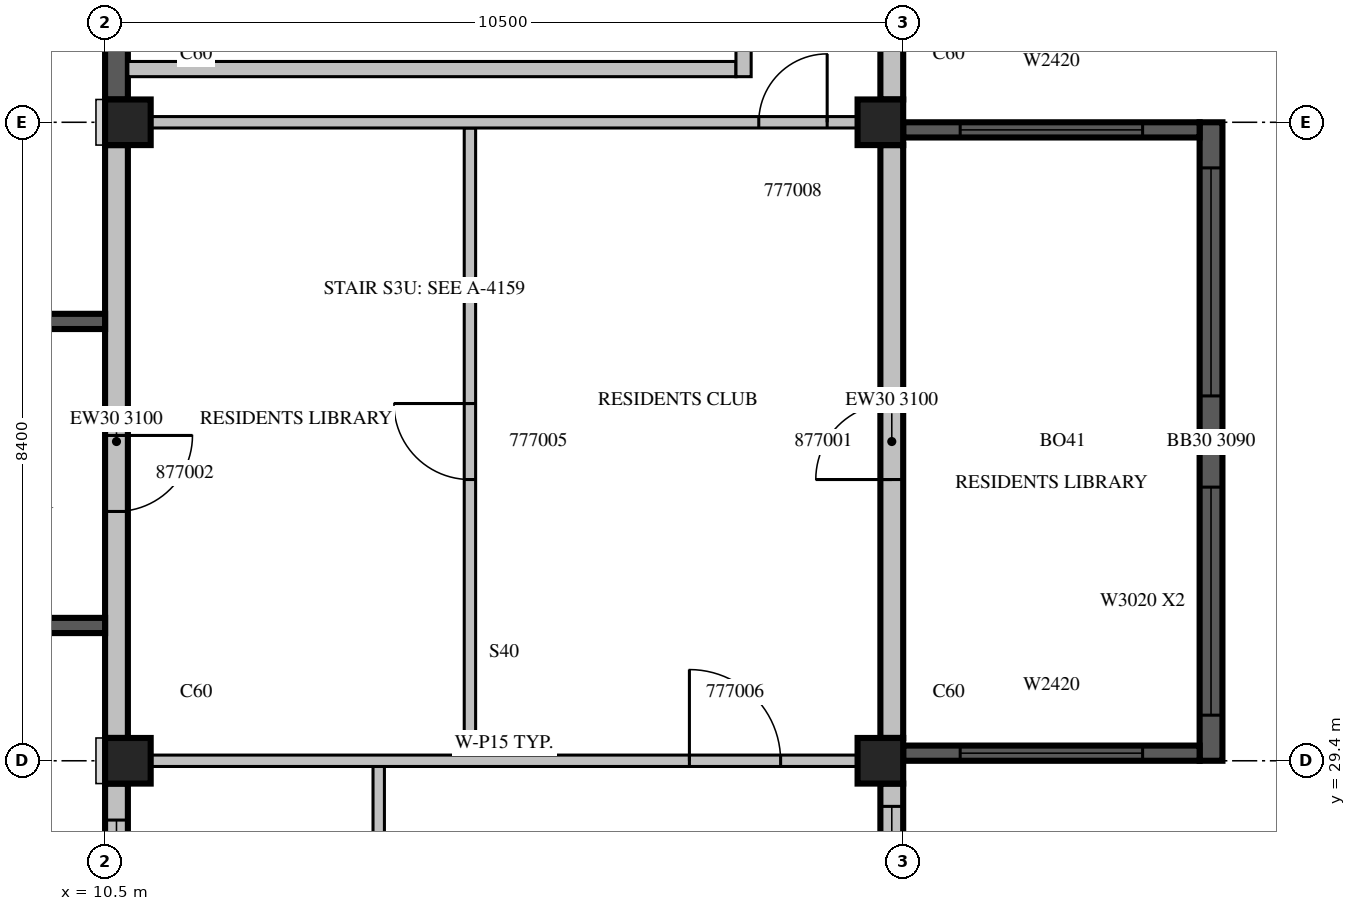
"""IFC4 building model, lengths in metres.
Left out: names, types, materials, properties, quantities, classifications, styles, units other than length and angle.
Written with IfcOpenShell. Run it as: python <this file> out.ifc"""

import sys

from ifc_helpers import new_model, si_unit, direction, frame, frame_2d, origin, origin_2d, place, context, subcontext, project, spatial, rectangle, extrude, source, transform, mapped, element, fill, save


model = new_model("IFC4")
c1 = context("Model", 3, precision=1e-05, world=origin(), true_north=direction((0.0, 1.0)))
c2 = subcontext(c1, "Body", "Model", "MODEL_VIEW")
j1 = project(units=[si_unit("LENGTHUNIT", "METRE"), si_unit("PLANEANGLEUNIT", "RADIAN")], contexts=[c1])
p1 = place(None, origin())
s1 = spatial("IfcSite", under=j1, at=p1, CompositionType="ELEMENT")
p2 = place(p1, origin())
s2 = spatial("IfcBuilding", under=s1, at=p2, CompositionType="ELEMENT")
p3 = place(p2, frame((0.0, 0.0, 330.0)))
s3 = spatial("IfcBuildingStorey", under=s2, at=p3, CompositionType="ELEMENT", Elevation=330.0)
m1 = source(origin(), c2, "Body", "SweptSolid", [
    extrude(rectangle(XDim=0.6, YDim=0.6, at=origin_2d()), origin(), (0.0, 0.0, 1.0), 3.5),
])
for number, where, z_axis, x_axis in (
    (1, (10.8, 29.4, 0.0), (0.0, 0.0, 1.0), (1.0, 0.0, 0.0)),
    (2, (20.7, 29.4, 0.0), (0.0, 0.0, 1.0), (1.0, 0.0, 0.0)),
    (3, (10.8, 37.8, 0.0), (0.0, 0.0, 1.0), (1.0, 0.0, 0.0)),
    (4, (20.7, 37.8, 0.0), (0.0, 0.0, 1.0), (1.0, 0.0, 0.0)),
):
    element("IfcColumn", number, at=place(p3, frame(where, z_axis=z_axis, x_axis=x_axis)), inside=s3, PredefinedType="COLUMN", context=c2, shape_type="MappedRepresentation", body=[
        mapped(m1, transform((0.0, 0.0, 0.0), scale=1.0)),
    ])
m2 = source(origin(), c2, "Body", "SweptSolid", [
    extrude(rectangle(XDim=7.5, YDim=0.3, at=frame_2d((3.75, 0.0))), origin(), (0.0, 0.0, 1.0), 3.1),
])
p4 = place(p3, frame((20.85, 21.6, 0.0), z_axis=(0.0, 0.0, 1.0), x_axis=(0.0, 1.0, 0.0)))
e5 = element("IfcWall", 5, at=p4, inside=s3, PredefinedType="STANDARD", context=c2, shape_type="MappedRepresentation", body=[
    mapped(m2, transform((0.0, 0.0, 0.0), scale=1.0)),
])
m3 = source(origin(), c2, "Body", "SweptSolid", [
    extrude(rectangle(XDim=1.8, YDim=2.0, at=frame_2d((0.9, 1.0))), frame((0.0, 0.16, 0.0), z_axis=(0.0, -1.0, 0.0), x_axis=(1.0, 0.0, 0.0)), (0.0, 0.0, 1.0), 0.32),
])
p5 = place(p4, frame((0.463, 0.0, 0.6)))
e6 = element("IfcOpeningElement", 6, at=p5, cuts=e5, PredefinedType="OPENING", context=c2, shape_type="MappedRepresentation", body=[
    mapped(m3, transform((0.0, 0.0, 0.0), scale=1.0)),
])
m4 = source(origin(), c2, "Body", "SweptSolid", [
    extrude(rectangle(XDim=3.0, YDim=2.0, at=frame_2d((1.5, 1.0))), frame((0.0, 0.16, 0.0), z_axis=(0.0, -1.0, 0.0), x_axis=(1.0, 0.0, 0.0)), (0.0, 0.0, 1.0), 0.32),
])
p6 = place(p4, frame((4.2, 0.0, 0.6)))
e7 = element("IfcOpeningElement", 7, at=p6, cuts=e5, PredefinedType="OPENING", context=c2, shape_type="MappedRepresentation", body=[
    mapped(m4, transform((0.0, 0.0, 0.0), scale=1.0)),
])
m5 = source(origin(), c2, "Body", "SweptSolid", [
    extrude(rectangle(XDim=7.8, YDim=0.3, at=frame_2d((3.9, 0.0))), origin(), (0.0, 0.0, 1.0), 3.1),
])
p7 = place(p3, frame((20.85, 29.7, 0.0), z_axis=(0.0, 0.0, 1.0), x_axis=(0.0, 1.0, 0.0)))
e8 = element("IfcWall", 8, at=p7, inside=s3, PredefinedType="STANDARD", context=c2, shape_type="MappedRepresentation", body=[
    mapped(m5, transform((0.0, 0.0, 0.0), scale=1.0)),
])
m6 = source(origin(), c2, "Body", "SweptSolid", [
    extrude(rectangle(XDim=1.0, YDim=2.1, at=frame_2d((0.5, 1.05))), frame((0.0, 0.16, 0.0), z_axis=(0.0, -1.0, 0.0), x_axis=(1.0, 0.0, 0.0)), (0.0, 0.0, 1.0), 0.32),
])
p8 = place(p7, frame((3.4, 0.0, 0.0)))
e9 = element("IfcOpeningElement", 9, at=p8, cuts=e8, PredefinedType="OPENING", context=c2, shape_type="MappedRepresentation", body=[
    mapped(m6, transform((0.0, 0.0, 0.0), scale=1.0)),
])
m7 = source(origin(), c2, "Body", "SweptSolid", [
    extrude(rectangle(XDim=5.58, YDim=0.3, at=frame_2d((2.79, 0.0))), origin(), (0.0, 0.0, 1.0), 3.1),
])
p9 = place(p3, frame((20.85, 38.1, 0.0), z_axis=(0.0, 0.0, 1.0), x_axis=(0.0, 1.0, 0.0)))
e10 = element("IfcWall", 10, at=p9, inside=s3, PredefinedType="STANDARD", context=c2, shape_type="MappedRepresentation", body=[
    mapped(m7, transform((0.0, 0.0, 0.0), scale=1.0)),
])
m8 = source(origin(), c2, "Body", "SweptSolid", [
    extrude(rectangle(XDim=3.6, YDim=2.0, at=frame_2d((1.8, 1.0))), frame((0.0, 0.16, 0.0), z_axis=(0.0, -1.0, 0.0), x_axis=(1.0, 0.0, 0.0)), (0.0, 0.0, 1.0), 0.32),
])
p10 = place(p9, frame((0.84, 0.0, 0.6)))
e11 = element("IfcOpeningElement", 11, at=p10, cuts=e10, PredefinedType="OPENING", context=c2, shape_type="MappedRepresentation", body=[
    mapped(m8, transform((0.0, 0.0, 0.0), scale=1.0)),
])
m9 = source(origin(), c2, "Body", "SweptSolid", [
    extrude(rectangle(XDim=5.58, YDim=0.3, at=frame_2d((2.79, 0.0))), origin(), (0.0, 0.0, 1.0), 3.1),
])
p11 = place(p3, frame((10.65, 43.68, 0.0), z_axis=(0.0, 0.0, 1.0), x_axis=(0.0, -1.0, 0.0)))
e12 = element("IfcWall", 12, at=p11, inside=s3, PredefinedType="SOLIDWALL", context=c2, shape_type="MappedRepresentation", body=[
    mapped(m9, transform((0.0, 0.0, 0.0), scale=1.0)),
])
p12 = place(p3, frame((10.65, 37.5, 0.0), z_axis=(0.0, 0.0, 1.0), x_axis=(0.0, -1.0, 0.0)))
e13 = element("IfcWall", 13, at=p12, inside=s3, PredefinedType="STANDARD", context=c2, shape_type="MappedRepresentation", body=[
    mapped(m5, transform((0.0, 0.0, 0.0), scale=1.0)),
])
p13 = place(p12, frame((3.82, 0.0, 0.0)))
e14 = element("IfcOpeningElement", 14, at=p13, cuts=e13, PredefinedType="OPENING", context=c2, shape_type="MappedRepresentation", body=[
    mapped(m6, transform((0.0, 0.0, 0.0), scale=1.0)),
])
p14 = place(p3, frame((10.65, 29.1, 0.0), z_axis=(0.0, 0.0, 1.0), x_axis=(0.0, -1.0, 0.0)))
e15 = element("IfcWall", 15, at=p14, inside=s3, PredefinedType="STANDARD", context=c2, shape_type="MappedRepresentation", body=[
    mapped(m2, transform((0.0, 0.0, 0.0), scale=1.0)),
])
p15 = place(p14, frame((3.36, 0.0, 0.6)))
e16 = element("IfcOpeningElement", 16, at=p15, cuts=e15, PredefinedType="OPENING", context=c2, shape_type="MappedRepresentation", body=[
    mapped(m8, transform((0.0, 0.0, 0.0), scale=1.0)),
])
m10 = source(origin(), c2, "Body", "SweptSolid", [
    extrude(rectangle(XDim=2.4, YDim=2.0, at=frame_2d((1.2, 1.0))), frame((0.0, 0.16, 0.0), z_axis=(0.0, -1.0, 0.0), x_axis=(1.0, 0.0, 0.0)), (0.0, 0.0, 1.0), 0.32),
])
p16 = place(p14, frame((0.48, 0.0, 0.6)))
e17 = element("IfcOpeningElement", 17, at=p16, cuts=e15, PredefinedType="OPENING", context=c2, shape_type="MappedRepresentation", body=[
    mapped(m10, transform((0.0, 0.0, 0.0), scale=1.0)),
])
m11 = source(origin(), c2, "Body", "SweptSolid", [
    extrude(rectangle(XDim=8.4, YDim=0.3, at=frame_2d((4.2, 0.0))), origin(), (0.0, 0.0, 1.0), 3.09),
])
p17 = place(p3, frame((25.05, 29.4, 0.0), z_axis=(0.0, 0.0, 1.0), x_axis=(0.0, 1.0, 0.0)))
e18 = element("IfcWall", 18, at=p17, inside=s3, PredefinedType="SOLIDWALL", context=c2, shape_type="MappedRepresentation", body=[
    mapped(m11, transform((0.0, 0.0, 0.0), scale=1.0)),
])
p18 = place(p17, frame((0.6, 0.0, 0.6)))
e19 = element("IfcOpeningElement", 19, at=p18, cuts=e18, PredefinedType="OPENING", context=c2, shape_type="MappedRepresentation", body=[
    mapped(m4, transform((0.0, 0.0, 0.0), scale=1.0)),
])
p19 = place(p17, frame((4.8, 0.0, 0.6)))
e20 = element("IfcOpeningElement", 20, at=p19, cuts=e18, PredefinedType="OPENING", context=c2, shape_type="MappedRepresentation", body=[
    mapped(m4, transform((0.0, 0.0, 0.0), scale=1.0)),
])
m12 = source(origin(), c2, "Body", "SweptSolid", [
    extrude(rectangle(XDim=3.9, YDim=0.2, at=frame_2d((1.95, 0.0))), origin(), (0.0, 0.0, 1.0), 3.09),
])
p20 = place(p3, frame((21.0, 29.5, 0.0), z_axis=(0.0, 0.0, 1.0), x_axis=(1.0, 0.0, 0.0)))
e21 = element("IfcWall", 21, at=p20, inside=s3, PredefinedType="SOLIDWALL", context=c2, shape_type="MappedRepresentation", body=[
    mapped(m12, transform((0.0, 0.0, 0.0), scale=1.0)),
])
m13 = source(origin(), c2, "Body", "SweptSolid", [
    extrude(rectangle(XDim=2.4, YDim=2.0, at=frame_2d((1.2, 1.0))), frame((0.0, 0.11, 0.0), z_axis=(0.0, -1.0, 0.0), x_axis=(1.0, 0.0, 0.0)), (0.0, 0.0, 1.0), 0.22),
])
p21 = place(p20, frame((0.75, 0.0, 0.6)))
e22 = element("IfcOpeningElement", 22, at=p21, cuts=e21, PredefinedType="OPENING", context=c2, shape_type="MappedRepresentation", body=[
    mapped(m13, transform((0.0, 0.0, 0.0), scale=1.0)),
])
p22 = place(p3, frame((21.0, 37.7, 0.0), z_axis=(0.0, 0.0, 1.0), x_axis=(1.0, 0.0, 0.0)))
e23 = element("IfcWall", 23, at=p22, inside=s3, PredefinedType="SOLIDWALL", context=c2, shape_type="MappedRepresentation", body=[
    mapped(m12, transform((0.0, 0.0, 0.0), scale=1.0)),
])
p23 = place(p22, frame((0.75, 0.0, 0.6)))
e24 = element("IfcOpeningElement", 24, at=p23, cuts=e23, PredefinedType="OPENING", context=c2, shape_type="MappedRepresentation", body=[
    mapped(m13, transform((0.0, 0.0, 0.0), scale=1.0)),
])
p24 = place(p3, frame((10.5, 35.18, 0.0), z_axis=(0.0, 0.0, 1.0), x_axis=(-1.0, 0.0, 0.0)))
e25 = element("IfcWall", 25, at=p24, inside=s3, PredefinedType="SOLIDWALL", context=c2, shape_type="MappedRepresentation", body=[
    mapped(m12, transform((0.0, 0.0, 0.0), scale=1.0)),
])
p25 = place(p24, frame((0.75, 0.0, 0.6)))
e26 = element("IfcOpeningElement", 26, at=p25, cuts=e25, PredefinedType="OPENING", context=c2, shape_type="MappedRepresentation", body=[
    mapped(m13, transform((0.0, 0.0, 0.0), scale=1.0)),
])
p26 = place(p3, frame((10.5, 31.18, 0.0), z_axis=(0.0, 0.0, 1.0), x_axis=(-1.0, 0.0, 0.0)))
e27 = element("IfcWall", 27, at=p26, inside=s3, PredefinedType="SOLIDWALL", context=c2, shape_type="MappedRepresentation", body=[
    mapped(m12, transform((0.0, 0.0, 0.0), scale=1.0)),
])
p27 = place(p26, frame((0.75, 0.0, 0.6)))
e28 = element("IfcOpeningElement", 28, at=p27, cuts=e27, PredefinedType="OPENING", context=c2, shape_type="MappedRepresentation", body=[
    mapped(m13, transform((0.0, 0.0, 0.0), scale=1.0)),
])
m14 = source(origin(), c2, "Body", "SweptSolid", [
    extrude(rectangle(XDim=8.0, YDim=0.2, at=frame_2d((4.0, 0.0))), origin(), (0.0, 0.0, 1.0), 3.1),
])
p28 = place(p3, frame((10.8, 38.5, 0.0), z_axis=(0.0, 0.0, 1.0), x_axis=(1.0, 0.0, 0.0)))
e29 = element("IfcWall", 29, at=p28, inside=s3, PredefinedType="PARTITIONING", context=c2, shape_type="MappedRepresentation", body=[
    mapped(m14, transform((0.0, 0.0, 0.0), scale=1.0)),
])
m15 = source(origin(), c2, "Body", "SweptSolid", [
    extrude(rectangle(XDim=5.45, YDim=0.2, at=frame_2d((2.725, 0.0))), origin(), (0.0, 0.0, 1.0), 3.1),
])
p29 = place(p3, frame((18.9, 38.4, 0.0), z_axis=(0.0, 0.0, 1.0), x_axis=(0.0, 1.0, 0.0)))
e30 = element("IfcWall", 30, at=p29, inside=s3, PredefinedType="PARTITIONING", context=c2, shape_type="MappedRepresentation", body=[
    mapped(m15, transform((0.0, 0.0, 0.0), scale=1.0)),
])
m16 = source(origin(), c2, "Body", "SweptSolid", [
    extrude(rectangle(XDim=1.2, YDim=2.1, at=frame_2d((0.6, 1.05))), frame((0.0, 0.11, 0.0), z_axis=(0.0, -1.0, 0.0), x_axis=(1.0, 0.0, 0.0)), (0.0, 0.0, 1.0), 0.22),
])
p30 = place(p29, frame((0.4, 0.0, 0.0)))
e31 = element("IfcOpeningElement", 31, at=p30, cuts=e30, PredefinedType="OPENING", context=c2, shape_type="MappedRepresentation", body=[
    mapped(m16, transform((0.0, 0.0, 0.0), scale=1.0)),
])
m17 = source(origin(), c2, "Body", "SweptSolid", [
    extrude(rectangle(XDim=0.9, YDim=2.1, at=frame_2d((0.45, 1.05))), frame((0.0, 0.11, 0.0), z_axis=(0.0, -1.0, 0.0), x_axis=(1.0, 0.0, 0.0)), (0.0, 0.0, 1.0), 0.22),
])
p31 = place(p29, frame((3.25, 0.0, 0.0)))
e32 = element("IfcOpeningElement", 32, at=p31, cuts=e30, PredefinedType="OPENING", context=c2, shape_type="MappedRepresentation", body=[
    mapped(m17, transform((0.0, 0.0, 0.0), scale=1.0)),
])
m18 = source(origin(), c2, "Body", "SweptSolid", [
    extrude(rectangle(XDim=7.725, YDim=0.15, at=frame_2d((3.862, 0.0))), origin(), (0.0, 0.0, 1.0), 3.1),
])
p32 = place(p3, frame((14.1, 29.325, 0.0), z_axis=(0.0, 0.0, 1.0), x_axis=(0.0, -1.0, 0.0)))
e33 = element("IfcWall", 33, at=p32, inside=s3, PredefinedType="PARTITIONING", context=c2, shape_type="MappedRepresentation", body=[
    mapped(m18, transform((0.0, 0.0, 0.0), scale=1.0)),
])
m19 = source(origin(), c2, "Body", "SweptSolid", [
    extrude(rectangle(XDim=2.2, YDim=2.1, at=frame_2d((1.1, 1.05))), frame((0.0, 0.085, 0.0), z_axis=(0.0, -1.0, 0.0), x_axis=(1.0, 0.0, 0.0)), (0.0, 0.0, 1.0), 0.17),
])
p33 = place(p32, frame((5.325, 0.0, 0.0)))
e34 = element("IfcOpeningElement", 34, at=p33, cuts=e33, PredefinedType="OPENING", context=c2, shape_type="MappedRepresentation", body=[
    mapped(m19, transform((0.0, 0.0, 0.0), scale=1.0)),
])
p34 = place(p3, frame((15.3, 37.725, 0.0), z_axis=(0.0, 0.0, 1.0), x_axis=(0.0, -1.0, 0.0)))
e35 = element("IfcWall", 35, at=p34, inside=s3, PredefinedType="PARTITIONING", context=c2, shape_type="SweptSolid", body=[
    extrude(rectangle(XDim=8.325, YDim=0.15, at=frame_2d((4.162, 0.0))), origin(), (0.0, 0.0, 1.0), 3.1),
])
m20 = source(origin(), c2, "Body", "SweptSolid", [
    extrude(rectangle(XDim=1.0, YDim=2.1, at=frame_2d((0.5, 1.05))), frame((0.0, 0.085, 0.0), z_axis=(0.0, -1.0, 0.0), x_axis=(1.0, 0.0, 0.0)), (0.0, 0.0, 1.0), 0.17),
])
p35 = place(p34, frame((3.625, 0.0, 0.0)))
e36 = element("IfcOpeningElement", 36, at=p35, cuts=e35, PredefinedType="OPENING", context=c2, shape_type="MappedRepresentation", body=[
    mapped(m20, transform((0.0, 0.0, 0.0), scale=1.0)),
])
p36 = place(p3, frame((11.099, 29.4, 0.0), z_axis=(0.0, 0.0, 1.0), x_axis=(1.0, 0.0, 0.0)))
e37 = element("IfcWall", 37, at=p36, inside=s3, PredefinedType="PARTITIONING", context=c2, shape_type="SweptSolid", body=[
    extrude(rectangle(XDim=9.302, YDim=0.15, at=frame_2d((4.651, 0.0))), origin(), (0.0, 0.0, 1.0), 3.1),
])
m21 = source(origin(), c2, "Body", "SweptSolid", [
    extrude(rectangle(XDim=1.2, YDim=2.1, at=frame_2d((0.6, 1.05))), frame((0.0, 0.085, 0.0), z_axis=(0.0, -1.0, 0.0), x_axis=(1.0, 0.0, 0.0)), (0.0, 0.0, 1.0), 0.17),
])
p37 = place(p36, frame((7.088, 0.0, 0.0)))
e38 = element("IfcOpeningElement", 38, at=p37, cuts=e37, PredefinedType="OPENING", context=c2, shape_type="MappedRepresentation", body=[
    mapped(m21, transform((0.0, 0.0, 0.0), scale=1.0)),
])
m22 = source(origin(), c2, "Body", "SweptSolid", [
    extrude(rectangle(XDim=9.302, YDim=0.15, at=frame_2d((4.651, 0.0))), origin(), (0.0, 0.0, 1.0), 3.1),
])
p38 = place(p3, frame((20.401, 37.8, 0.0), z_axis=(0.0, 0.0, 1.0), x_axis=(-1.0, 0.0, 0.0)))
e39 = element("IfcWall", 39, at=p38, inside=s3, PredefinedType="PARTITIONING", context=c2, shape_type="MappedRepresentation", body=[
    mapped(m22, transform((0.0, 0.0, 0.0), scale=1.0)),
])
m23 = source(origin(), c2, "Body", "SweptSolid", [
    extrude(rectangle(XDim=0.9, YDim=2.1, at=frame_2d((0.45, 1.05))), frame((0.0, 0.085, 0.0), z_axis=(0.0, -1.0, 0.0), x_axis=(1.0, 0.0, 0.0)), (0.0, 0.0, 1.0), 0.17),
])
p39 = place(p38, frame((0.401, 0.0, 0.0)))
e40 = element("IfcOpeningElement", 40, at=p39, cuts=e39, PredefinedType="OPENING", context=c2, shape_type="MappedRepresentation", body=[
    mapped(m23, transform((0.0, 0.0, 0.0), scale=1.0)),
])
m24 = source(origin(), c2, "Body", "SweptSolid", [
    extrude(rectangle(XDim=3.0, YDim=2.0, at=frame_2d((1.5, 1.0))), frame((0.0, 0.03, 0.0), z_axis=(0.0, -1.0, 0.0), x_axis=(1.0, 0.0, 0.0)), (0.0, 0.0, 1.0), 0.06),
])
p40 = place(p6, origin())
e41 = element("IfcWindow", 41, at=p40, inside=s3, PartitioningType="SINGLE_PANEL", PredefinedType="WINDOW", context=c2, shape_type="MappedRepresentation", body=[
    mapped(m24, transform((0.0, 0.0, 0.0), scale=1.0)),
])
fill(e7, e41)
m25 = source(origin(), c2, "Body", "SweptSolid", [
    extrude(rectangle(XDim=2.4, YDim=2.0, at=frame_2d((1.2, 1.0))), frame((0.0, 0.03, 0.0), z_axis=(0.0, -1.0, 0.0), x_axis=(1.0, 0.0, 0.0)), (0.0, 0.0, 1.0), 0.06),
])
p41 = place(p16, origin())
e42 = element("IfcWindow", 42, at=p41, inside=s3, PartitioningType="SINGLE_PANEL", PredefinedType="WINDOW", context=c2, shape_type="MappedRepresentation", body=[
    mapped(m25, transform((0.0, 0.0, 0.0), scale=1.0)),
])
fill(e17, e42)
p42 = place(p18, origin())
e43 = element("IfcWindow", 43, at=p42, inside=s3, PartitioningType="SINGLE_PANEL", PredefinedType="WINDOW", context=c2, shape_type="MappedRepresentation", body=[
    mapped(m24, transform((0.0, 0.0, 0.0), scale=1.0)),
])
fill(e19, e43)
p43 = place(p19, origin())
e44 = element("IfcWindow", 44, at=p43, inside=s3, PartitioningType="SINGLE_PANEL", PredefinedType="WINDOW", context=c2, shape_type="MappedRepresentation", body=[
    mapped(m24, transform((0.0, 0.0, 0.0), scale=1.0)),
])
fill(e20, e44)
p44 = place(p21, origin())
e45 = element("IfcWindow", 45, at=p44, inside=s3, PartitioningType="SINGLE_PANEL", PredefinedType="WINDOW", context=c2, shape_type="MappedRepresentation", body=[
    mapped(m25, transform((0.0, 0.0, 0.0), scale=1.0)),
])
fill(e22, e45)
p45 = place(p23, origin())
e46 = element("IfcWindow", 46, at=p45, inside=s3, PartitioningType="SINGLE_PANEL", PredefinedType="WINDOW", context=c2, shape_type="MappedRepresentation", body=[
    mapped(m25, transform((0.0, 0.0, 0.0), scale=1.0)),
])
fill(e24, e46)
m26 = source(origin(), c2, "Body", "SweptSolid", [
    extrude(rectangle(XDim=1.0, YDim=2.1, at=frame_2d((0.5, 1.05))), frame((0.0, 0.025, 0.0), z_axis=(0.0, -1.0, 0.0), x_axis=(1.0, 0.0, 0.0)), (0.0, 0.0, 1.0), 0.05),
])
p46 = place(p35, origin())
e47 = element("IfcDoor", 47, at=p46, inside=s3, OperationType="SINGLE_SWING_RIGHT", PredefinedType="DOOR", context=c2, shape_type="MappedRepresentation", body=[
    mapped(m26, transform((0.0, 0.0, 0.0), scale=1.0)),
])
fill(e36, e47)
m27 = source(origin(), c2, "Body", "SweptSolid", [
    extrude(rectangle(XDim=1.2, YDim=2.1, at=frame_2d((0.6, 1.05))), frame((0.0, 0.025, 0.0), z_axis=(0.0, -1.0, 0.0), x_axis=(1.0, 0.0, 0.0)), (0.0, 0.0, 1.0), 0.05),
])
p47 = place(p37, origin())
e48 = element("IfcDoor", 48, at=p47, inside=s3, OperationType="SINGLE_SWING_LEFT", PredefinedType="DOOR", context=c2, shape_type="MappedRepresentation", body=[
    mapped(m27, transform((0.0, 0.0, 0.0), scale=1.0)),
])
fill(e38, e48)
m28 = source(origin(), c2, "Body", "SweptSolid", [
    extrude(rectangle(XDim=0.9, YDim=2.1, at=frame_2d((0.45, 1.05))), frame((0.0, 0.025, 0.0), z_axis=(0.0, -1.0, 0.0), x_axis=(1.0, 0.0, 0.0)), (0.0, 0.0, 1.0), 0.05),
])
p48 = place(p39, origin())
e49 = element("IfcDoor", 49, at=p48, inside=s3, OperationType="SINGLE_SWING_RIGHT", PredefinedType="DOOR", context=c2, shape_type="MappedRepresentation", body=[
    mapped(m28, transform((0.0, 0.0, 0.0), scale=1.0)),
])
fill(e40, e49)
p49 = place(p8, origin())
e50 = element("IfcDoor", 50, at=p49, inside=s3, OperationType="SINGLE_SWING_LEFT", PredefinedType="DOOR", context=c2, shape_type="MappedRepresentation", body=[
    mapped(m26, transform((0.0, 0.0, 0.0), scale=1.0)),
])
fill(e9, e50)
p50 = place(p13, origin())
e51 = element("IfcDoor", 51, at=p50, inside=s3, OperationType="SINGLE_SWING_LEFT", PredefinedType="DOOR", context=c2, shape_type="MappedRepresentation", body=[
    mapped(m26, transform((0.0, 0.0, 0.0), scale=1.0)),
])
fill(e14, e51)
save(model, sys.argv[1])
